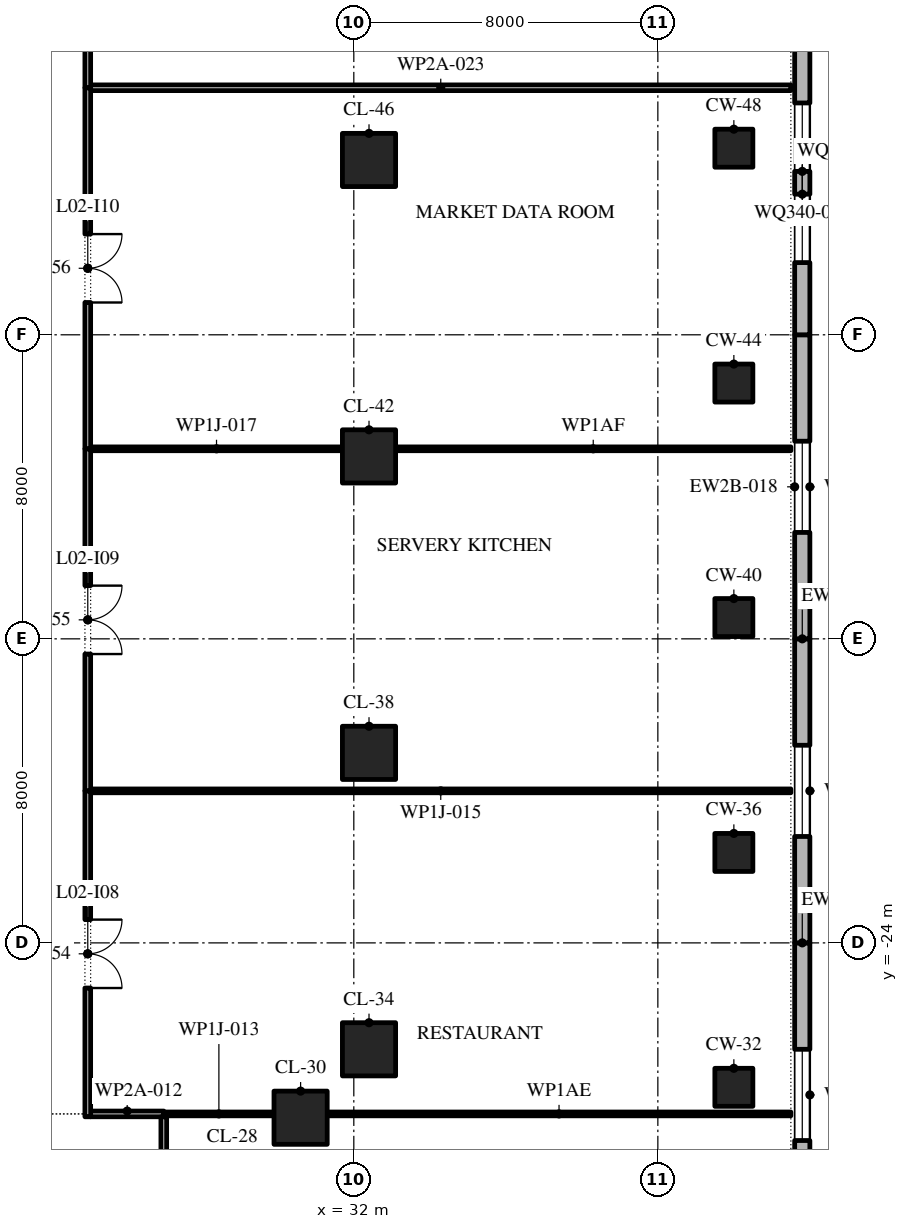
"""IFC4 building model, lengths in metres.
Left out: names, types, materials, properties, quantities, classifications, styles, units other than length and angle.
Written with IfcOpenShell. Run it as: python <this file> out.ifc"""

import sys

from ifc_helpers import new_model, si_unit, direction, frame, frame_2d, origin, origin_2d, place, context, subcontext, project, spatial, polyline, rectangle, outline, extrude, element, fill, save


model = new_model("IFC4")
c1 = context("Model", 3, precision=1e-05, world=origin(), true_north=direction((0.0, 1.0)))
c2 = subcontext(c1, "Body", "Model", "MODEL_VIEW")
j1 = project(units=[si_unit("LENGTHUNIT", "METRE"), si_unit("PLANEANGLEUNIT", "RADIAN")], contexts=[c1])
p1 = place(None, origin())
s1 = spatial("IfcSite", under=j1, at=p1, CompositionType="ELEMENT")
p2 = place(p1, origin())
s2 = spatial("IfcBuilding", under=s1, at=p2, CompositionType="ELEMENT")
p3 = place(p2, frame((0.0, 0.0, 14.0)))
s3 = spatial("IfcBuildingStorey", under=s2, at=p3, CompositionType="ELEMENT", Elevation=14.0)
p4 = place(p3, frame((30.6, -28.6, 0.0), z_axis=(0.0, 0.0, 1.0), x_axis=(1.0, 0.0, 0.0)))
e1 = element("IfcColumn", 1, at=p4, inside=s3, PredefinedType="COLUMN", context=c2, shape_type="SweptSolid", body=[
    extrude(rectangle(XDim=1.4, YDim=1.4, at=origin_2d()), origin(), (0.0, 0.0, 1.0), 5.2),
])
p5 = place(p3, frame((42.0, -27.8, 0.0), z_axis=(0.0, 0.0, 1.0), x_axis=(1.0, 0.0, 0.0)))
e2 = element("IfcColumn", 2, at=p5, inside=s3, PredefinedType="COLUMN", context=c2, shape_type="SweptSolid", body=[
    extrude(rectangle(XDim=1.0, YDim=1.0, at=origin_2d()), origin(), (0.0, 0.0, 1.0), 5.2),
])
p6 = place(p3, frame((32.4, -26.8, 0.0), z_axis=(0.0, 0.0, 1.0), x_axis=(1.0, 0.0, 0.0)))
e3 = element("IfcColumn", 3, at=p6, inside=s3, PredefinedType="COLUMN", context=c2, shape_type="SweptSolid", body=[
    extrude(rectangle(XDim=1.4, YDim=1.4, at=origin_2d()), origin(), (0.0, 0.0, 1.0), 5.2),
])
p7 = place(p3, frame((42.0, -21.62, 0.0), z_axis=(0.0, 0.0, 1.0), x_axis=(1.0, 0.0, 0.0)))
e4 = element("IfcColumn", 4, at=p7, inside=s3, PredefinedType="COLUMN", context=c2, shape_type="SweptSolid", body=[
    extrude(rectangle(XDim=1.0, YDim=1.0, at=origin_2d()), origin(), (0.0, 0.0, 1.0), 5.2),
])
p8 = place(p3, frame((32.4, -19.0, 0.0), z_axis=(0.0, 0.0, 1.0), x_axis=(1.0, 0.0, 0.0)))
e5 = element("IfcColumn", 5, at=p8, inside=s3, PredefinedType="COLUMN", context=c2, shape_type="SweptSolid", body=[
    extrude(rectangle(XDim=1.4, YDim=1.4, at=origin_2d()), origin(), (0.0, 0.0, 1.0), 5.2),
])
p9 = place(p3, frame((42.0, -15.44, 0.0), z_axis=(0.0, 0.0, 1.0), x_axis=(1.0, 0.0, 0.0)))
e6 = element("IfcColumn", 6, at=p9, inside=s3, PredefinedType="COLUMN", context=c2, shape_type="SweptSolid", body=[
    extrude(rectangle(XDim=1.0, YDim=1.0, at=origin_2d()), origin(), (0.0, 0.0, 1.0), 5.2),
])
p10 = place(p3, frame((32.4, -11.2, 0.0), z_axis=(0.0, 0.0, 1.0), x_axis=(1.0, 0.0, 0.0)))
e7 = element("IfcColumn", 7, at=p10, inside=s3, PredefinedType="COLUMN", context=c2, shape_type="SweptSolid", body=[
    extrude(rectangle(XDim=1.4, YDim=1.4, at=origin_2d()), origin(), (0.0, 0.0, 1.0), 5.2),
])
p11 = place(p3, frame((42.0, -9.27, 0.0), z_axis=(0.0, 0.0, 1.0), x_axis=(1.0, 0.0, 0.0)))
e8 = element("IfcColumn", 8, at=p11, inside=s3, PredefinedType="COLUMN", context=c2, shape_type="SweptSolid", body=[
    extrude(rectangle(XDim=1.0, YDim=1.0, at=origin_2d()), origin(), (0.0, 0.0, 1.0), 5.2),
])
p12 = place(p3, frame((32.4, -3.4, 0.0), z_axis=(0.0, 0.0, 1.0), x_axis=(1.0, 0.0, 0.0)))
e9 = element("IfcColumn", 9, at=p12, inside=s3, PredefinedType="COLUMN", context=c2, shape_type="SweptSolid", body=[
    extrude(rectangle(XDim=1.4, YDim=1.4, at=origin_2d()), origin(), (0.0, 0.0, 1.0), 5.2),
])
p13 = place(p3, frame((42.0, -3.09, 0.0), z_axis=(0.0, 0.0, 1.0), x_axis=(1.0, 0.0, 0.0)))
e10 = element("IfcColumn", 10, at=p13, inside=s3, PredefinedType="COLUMN", context=c2, shape_type="SweptSolid", body=[
    extrude(rectangle(XDim=1.0, YDim=1.0, at=origin_2d()), origin(), (0.0, 0.0, 1.0), 5.2),
])
p14 = place(p3, frame((43.8, -32.0, 0.0), z_axis=(0.0, 0.0, 1.0), x_axis=(0.0, 1.0, 0.0)))
e11 = element("IfcWall", 11, at=p14, inside=s3, PredefinedType="STANDARD", context=c2, shape_type="SweptSolid", body=[
    extrude(rectangle(XDim=8.0, YDim=0.4, at=frame_2d((4.0, 0.0))), origin(), (0.0, 0.0, 1.0), 4.9),
])
p15 = place(p14, frame((2.8, 0.0, 0.9)))
e12 = element("IfcOpeningElement", 12, at=p15, cuts=e11, PredefinedType="OPENING", context=c2, shape_type="SweptSolid", body=[
    extrude(outline(polyline([(0.0, 0.0), (2.4, 0.0), (2.4, 1.7), (2.379, 1.976), (2.315, 2.246), (2.212, 2.502), (2.07, 2.74), (1.893, 2.954), (1.686, 3.137), (1.453, 3.287), (1.2, 3.4), (0.947, 3.287), (0.714, 3.137), (0.507, 2.954), (0.33, 2.74), (0.188, 2.502), (0.084, 2.246), (0.021, 1.976), (0.0, 1.7), (0.0, 0.0)])), frame((0.0, 0.21, 0.0), z_axis=(0.0, -1.0, 0.0), x_axis=(1.0, 0.0, 0.0)), (0.0, 0.0, 1.0), 0.42),
])
p16 = place(p3, frame((43.8, -24.0, 0.0), z_axis=(0.0, 0.0, 1.0), x_axis=(0.0, 1.0, 0.0)))
e13 = element("IfcWall", 13, at=p16, inside=s3, PredefinedType="STANDARD", context=c2, shape_type="SweptSolid", body=[
    extrude(rectangle(XDim=8.0, YDim=0.4, at=frame_2d((4.0, 0.0))), origin(), (0.0, 0.0, 1.0), 4.9),
])
p17 = place(p16, frame((2.8, 0.0, 0.9)))
e14 = element("IfcOpeningElement", 14, at=p17, cuts=e13, PredefinedType="OPENING", context=c2, shape_type="SweptSolid", body=[
    extrude(outline(polyline([(0.0, 0.0), (2.4, 0.0), (2.4, 1.7), (2.379, 1.976), (2.315, 2.246), (2.212, 2.502), (2.07, 2.74), (1.893, 2.954), (1.686, 3.137), (1.453, 3.287), (1.2, 3.4), (0.947, 3.287), (0.714, 3.137), (0.507, 2.954), (0.33, 2.74), (0.188, 2.502), (0.084, 2.246), (0.021, 1.976), (0.0, 1.7), (0.0, 0.0)])), frame((0.0, 0.21, 0.0), z_axis=(0.0, -1.0, 0.0), x_axis=(1.0, 0.0, 0.0)), (0.0, 0.0, 1.0), 0.42),
])
p18 = place(p3, frame((43.8, -16.0, 0.0), z_axis=(0.0, 0.0, 1.0), x_axis=(0.0, 1.0, 0.0)))
e15 = element("IfcWall", 15, at=p18, inside=s3, PredefinedType="STANDARD", context=c2, shape_type="SweptSolid", body=[
    extrude(rectangle(XDim=8.0, YDim=0.4, at=frame_2d((4.0, 0.0))), origin(), (0.0, 0.0, 1.0), 4.9),
])
p19 = place(p18, frame((2.8, 0.0, 0.9)))
e16 = element("IfcOpeningElement", 16, at=p19, cuts=e15, PredefinedType="OPENING", context=c2, shape_type="SweptSolid", body=[
    extrude(outline(polyline([(0.0, 0.0), (2.4, 0.0), (2.4, 1.7), (2.379, 1.976), (2.315, 2.246), (2.212, 2.502), (2.07, 2.74), (1.893, 2.954), (1.686, 3.137), (1.453, 3.287), (1.2, 3.4), (0.947, 3.287), (0.714, 3.137), (0.507, 2.954), (0.33, 2.74), (0.188, 2.502), (0.084, 2.246), (0.021, 1.976), (0.0, 1.7), (0.0, 0.0)])), frame((0.0, 0.21, 0.0), z_axis=(0.0, -1.0, 0.0), x_axis=(1.0, 0.0, 0.0)), (0.0, 0.0, 1.0), 0.42),
])
p20 = place(p3, frame((43.8, -8.0, 0.0), z_axis=(0.0, 0.0, 1.0), x_axis=(0.0, 1.0, 0.0)))
e17 = element("IfcWall", 17, at=p20, inside=s3, PredefinedType="STANDARD", context=c2, shape_type="SweptSolid", body=[
    extrude(rectangle(XDim=8.0, YDim=0.4, at=frame_2d((4.0, 0.0))), origin(), (0.0, 0.0, 1.0), 4.9),
])
p21 = place(p20, frame((1.9, 0.0, 0.9)))
e18 = element("IfcOpeningElement", 18, at=p21, cuts=e17, PredefinedType="OPENING", context=c2, shape_type="SweptSolid", body=[
    extrude(outline(polyline([(0.0, 0.0), (1.8, 0.0), (1.8, 1.841), (1.785, 2.076), (1.739, 2.307), (1.663, 2.53), (1.559, 2.741), (1.428, 2.937), (1.273, 3.114), (1.096, 3.269), (0.9, 3.4), (0.704, 3.269), (0.527, 3.114), (0.372, 2.937), (0.241, 2.741), (0.137, 2.53), (0.061, 2.307), (0.015, 2.076), (0.0, 1.841), (0.0, 0.0)])), frame((0.0, 0.21, 0.0), z_axis=(0.0, -1.0, 0.0), x_axis=(1.0, 0.0, 0.0)), (0.0, 0.0, 1.0), 0.42),
])
p22 = place(p20, frame((4.3, 0.0, 0.9)))
e19 = element("IfcOpeningElement", 19, at=p22, cuts=e17, PredefinedType="OPENING", context=c2, shape_type="SweptSolid", body=[
    extrude(outline(polyline([(0.0, 0.0), (1.8, 0.0), (1.8, 1.841), (1.785, 2.076), (1.739, 2.307), (1.663, 2.53), (1.559, 2.741), (1.428, 2.937), (1.273, 3.114), (1.096, 3.269), (0.9, 3.4), (0.704, 3.269), (0.527, 3.114), (0.372, 2.937), (0.241, 2.741), (0.137, 2.53), (0.061, 2.307), (0.015, 2.076), (0.0, 1.841), (0.0, 0.0)])), frame((0.0, 0.21, 0.0), z_axis=(0.0, -1.0, 0.0), x_axis=(1.0, 0.0, 0.0)), (0.0, 0.0, 1.0), 0.42),
])
p23 = place(p3, frame((25.075, -28.5, 0.0), z_axis=(0.0, 0.0, 1.0), x_axis=(1.0, 0.0, 0.0)))
e20 = element("IfcWall", 20, at=p23, inside=s3, PredefinedType="PARTITIONING", context=c2, shape_type="SweptSolid", body=[
    extrude(rectangle(XDim=1.925, YDim=0.15, at=frame_2d((0.962, 0.0))), origin(), (0.0, 0.0, 1.0), 4.9),
])
p24 = place(p3, frame((27.0, -28.5, 0.0), z_axis=(0.0, 0.0, 1.0), x_axis=(1.0, 0.0, 0.0)))
e21 = element("IfcWall", 21, at=p24, inside=s3, PredefinedType="PARTITIONING", context=c2, shape_type="SweptSolid", body=[
    extrude(rectangle(XDim=2.9, YDim=0.1, at=frame_2d((1.45, 0.0))), origin(), (0.0, 0.0, 1.0), 4.9),
])
p25 = place(p3, frame((31.3, -28.5, 0.0), z_axis=(0.0, 0.0, 1.0), x_axis=(1.0, 0.0, 0.0)))
e22 = element("IfcWall", 22, at=p25, inside=s3, PredefinedType="PARTITIONING", context=c2, shape_type="SweptSolid", body=[
    extrude(rectangle(XDim=12.2, YDim=0.1, at=frame_2d((6.1, 0.0))), origin(), (0.0, 0.0, 1.0), 4.364),
])
p26 = place(p3, frame((25.075, -20.0, 0.0), z_axis=(0.0, 0.0, 1.0), x_axis=(1.0, 0.0, 0.0)))
e23 = element("IfcWall", 23, at=p26, inside=s3, PredefinedType="PARTITIONING", context=c2, shape_type="SweptSolid", body=[
    extrude(rectangle(XDim=18.425, YDim=0.1, at=frame_2d((9.212, 0.0))), origin(), (0.0, 0.0, 1.0), 4.9),
])
p27 = place(p3, frame((25.075, -11.0, 0.0), z_axis=(0.0, 0.0, 1.0), x_axis=(1.0, 0.0, 0.0)))
e24 = element("IfcWall", 24, at=p27, inside=s3, PredefinedType="PARTITIONING", context=c2, shape_type="SweptSolid", body=[
    extrude(rectangle(XDim=6.625, YDim=0.1, at=frame_2d((3.312, 0.0))), origin(), (0.0, 0.0, 1.0), 4.9),
])
p28 = place(p3, frame((33.1, -11.0, 0.0), z_axis=(0.0, 0.0, 1.0), x_axis=(1.0, 0.0, 0.0)))
e25 = element("IfcWall", 25, at=p28, inside=s3, PredefinedType="PARTITIONING", context=c2, shape_type="SweptSolid", body=[
    extrude(rectangle(XDim=10.4, YDim=0.1, at=frame_2d((5.2, 0.0))), origin(), (0.0, 0.0, 1.0), 4.443),
])
p29 = place(p3, frame((25.075, -1.5, 0.0), z_axis=(0.0, 0.0, 1.0), x_axis=(1.0, 0.0, 0.0)))
e26 = element("IfcWall", 26, at=p29, inside=s3, PredefinedType="PARTITIONING", context=c2, shape_type="SweptSolid", body=[
    extrude(rectangle(XDim=18.425, YDim=0.15, at=frame_2d((9.212, 0.0))), origin(), (0.0, 0.0, 1.0), 4.9),
])
p30 = place(p3, frame((25.0, -28.575, 0.0), z_axis=(0.0, 0.0, 1.0), x_axis=(0.0, 1.0, 0.0)))
e27 = element("IfcWall", 27, at=p30, inside=s3, PredefinedType="PARTITIONING", context=c2, shape_type="SweptSolid", body=[
    extrude(rectangle(XDim=8.575, YDim=0.15, at=frame_2d((4.288, 0.0))), origin(), (0.0, 0.0, 1.0), 4.9),
])
p31 = place(p30, frame((3.387, 0.0, 0.0)))
e28 = element("IfcOpeningElement", 28, at=p31, cuts=e27, PredefinedType="OPENING", context=c2, shape_type="SweptSolid", body=[
    extrude(rectangle(XDim=1.8, YDim=2.1, at=frame_2d((0.9, 1.05))), frame((0.0, 0.085, 0.0), z_axis=(0.0, -1.0, 0.0), x_axis=(1.0, 0.0, 0.0)), (0.0, 0.0, 1.0), 0.17),
])
p32 = place(p3, frame((25.0, -20.0, 0.0), z_axis=(0.0, 0.0, 1.0), x_axis=(0.0, 1.0, 0.0)))
e29 = element("IfcWall", 29, at=p32, inside=s3, PredefinedType="PARTITIONING", context=c2, shape_type="SweptSolid", body=[
    extrude(rectangle(XDim=9.0, YDim=0.15, at=frame_2d((4.5, 0.0))), origin(), (0.0, 0.0, 1.0), 4.9),
])
p33 = place(p32, frame((3.6, 0.0, 0.0)))
e30 = element("IfcOpeningElement", 30, at=p33, cuts=e29, PredefinedType="OPENING", context=c2, shape_type="SweptSolid", body=[
    extrude(rectangle(XDim=1.8, YDim=2.1, at=frame_2d((0.9, 1.05))), frame((0.0, 0.085, 0.0), z_axis=(0.0, -1.0, 0.0), x_axis=(1.0, 0.0, 0.0)), (0.0, 0.0, 1.0), 0.17),
])
p34 = place(p3, frame((25.0, -11.0, 0.0), z_axis=(0.0, 0.0, 1.0), x_axis=(0.0, 1.0, 0.0)))
e31 = element("IfcWall", 31, at=p34, inside=s3, PredefinedType="PARTITIONING", context=c2, shape_type="SweptSolid", body=[
    extrude(rectangle(XDim=9.5, YDim=0.15, at=frame_2d((4.75, 0.0))), origin(), (0.0, 0.0, 1.0), 4.9),
])
p35 = place(p34, frame((3.85, 0.0, 0.0)))
e32 = element("IfcOpeningElement", 32, at=p35, cuts=e31, PredefinedType="OPENING", context=c2, shape_type="SweptSolid", body=[
    extrude(rectangle(XDim=1.8, YDim=2.1, at=frame_2d((0.9, 1.05))), frame((0.0, 0.085, 0.0), z_axis=(0.0, -1.0, 0.0), x_axis=(1.0, 0.0, 0.0)), (0.0, 0.0, 1.0), 0.17),
])
p36 = place(p3, frame((25.0, -1.5, 0.0), z_axis=(0.0, 0.0, 1.0), x_axis=(0.0, 1.0, 0.0)))
e33 = element("IfcWall", 33, at=p36, inside=s3, PredefinedType="PARTITIONING", context=c2, shape_type="SweptSolid", body=[
    extrude(rectangle(XDim=9.5, YDim=0.15, at=frame_2d((4.75, 0.0))), origin(), (0.0, 0.0, 1.0), 4.9),
])
p37 = place(p36, frame((3.85, 0.0, 0.0)))
e34 = element("IfcOpeningElement", 34, at=p37, cuts=e33, PredefinedType="OPENING", context=c2, shape_type="SweptSolid", body=[
    extrude(rectangle(XDim=1.8, YDim=2.1, at=frame_2d((0.9, 1.05))), frame((0.0, 0.085, 0.0), z_axis=(0.0, -1.0, 0.0), x_axis=(1.0, 0.0, 0.0)), (0.0, 0.0, 1.0), 0.17),
])
p38 = place(p3, frame((27.0, -32.0, 0.0), z_axis=(0.0, 0.0, 1.0), x_axis=(0.0, 1.0, 0.0)))
e35 = element("IfcWall", 35, at=p38, inside=s3, PredefinedType="PARTITIONING", context=c2, shape_type="SweptSolid", body=[
    extrude(rectangle(XDim=3.425, YDim=0.15, at=frame_2d((1.712, 0.0))), origin(), (0.0, 0.0, 1.0), 4.9),
])
p39 = place(p15, origin())
e36 = element("IfcWindow", 36, at=p39, inside=s3, PartitioningType="DOUBLE_PANEL_VERTICAL", PredefinedType="WINDOW", context=c2, shape_type="SweptSolid", body=[
    extrude(outline(polyline([(0.0, 0.0), (2.4, 0.0), (2.4, 1.7), (2.379, 1.976), (2.315, 2.246), (2.212, 2.502), (2.07, 2.74), (1.893, 2.954), (1.686, 3.137), (1.453, 3.287), (1.2, 3.4), (0.947, 3.287), (0.714, 3.137), (0.507, 2.954), (0.33, 2.74), (0.188, 2.502), (0.084, 2.246), (0.021, 1.976), (0.0, 1.7), (0.0, 0.0)])), frame((0.0, 0.03, 0.0), z_axis=(0.0, -1.0, 0.0), x_axis=(1.0, 0.0, 0.0)), (0.0, 0.0, 1.0), 0.06),
])
fill(e12, e36)
p40 = place(p17, origin())
e37 = element("IfcWindow", 37, at=p40, inside=s3, PartitioningType="DOUBLE_PANEL_VERTICAL", PredefinedType="WINDOW", context=c2, shape_type="SweptSolid", body=[
    extrude(outline(polyline([(0.0, 0.0), (2.4, 0.0), (2.4, 1.7), (2.379, 1.976), (2.315, 2.246), (2.212, 2.502), (2.07, 2.74), (1.893, 2.954), (1.686, 3.137), (1.453, 3.287), (1.2, 3.4), (0.947, 3.287), (0.714, 3.137), (0.507, 2.954), (0.33, 2.74), (0.188, 2.502), (0.084, 2.246), (0.021, 1.976), (0.0, 1.7), (0.0, 0.0)])), frame((0.0, 0.03, 0.0), z_axis=(0.0, -1.0, 0.0), x_axis=(1.0, 0.0, 0.0)), (0.0, 0.0, 1.0), 0.06),
])
fill(e14, e37)
p41 = place(p19, origin())
e38 = element("IfcWindow", 38, at=p41, inside=s3, PartitioningType="DOUBLE_PANEL_VERTICAL", PredefinedType="WINDOW", context=c2, shape_type="SweptSolid", body=[
    extrude(outline(polyline([(0.0, 0.0), (2.4, 0.0), (2.4, 1.7), (2.379, 1.976), (2.315, 2.246), (2.212, 2.502), (2.07, 2.74), (1.893, 2.954), (1.686, 3.137), (1.453, 3.287), (1.2, 3.4), (0.947, 3.287), (0.714, 3.137), (0.507, 2.954), (0.33, 2.74), (0.188, 2.502), (0.084, 2.246), (0.021, 1.976), (0.0, 1.7), (0.0, 0.0)])), frame((0.0, 0.03, 0.0), z_axis=(0.0, -1.0, 0.0), x_axis=(1.0, 0.0, 0.0)), (0.0, 0.0, 1.0), 0.06),
])
fill(e16, e38)
p42 = place(p21, origin())
e39 = element("IfcWindow", 39, at=p42, inside=s3, PartitioningType="DOUBLE_PANEL_VERTICAL", PredefinedType="WINDOW", context=c2, shape_type="SweptSolid", body=[
    extrude(outline(polyline([(0.0, 0.0), (1.8, 0.0), (1.8, 1.841), (1.785, 2.076), (1.739, 2.307), (1.663, 2.53), (1.559, 2.741), (1.428, 2.937), (1.273, 3.114), (1.096, 3.269), (0.9, 3.4), (0.704, 3.269), (0.527, 3.114), (0.372, 2.937), (0.241, 2.741), (0.137, 2.53), (0.061, 2.307), (0.015, 2.076), (0.0, 1.841), (0.0, 0.0)])), frame((0.0, 0.03, 0.0), z_axis=(0.0, -1.0, 0.0), x_axis=(1.0, 0.0, 0.0)), (0.0, 0.0, 1.0), 0.06),
])
fill(e18, e39)
p43 = place(p22, origin())
e40 = element("IfcWindow", 40, at=p43, inside=s3, PartitioningType="DOUBLE_PANEL_VERTICAL", PredefinedType="WINDOW", context=c2, shape_type="SweptSolid", body=[
    extrude(outline(polyline([(0.0, 0.0), (1.8, 0.0), (1.8, 1.841), (1.785, 2.076), (1.739, 2.307), (1.663, 2.53), (1.559, 2.741), (1.428, 2.937), (1.273, 3.114), (1.096, 3.269), (0.9, 3.4), (0.704, 3.269), (0.527, 3.114), (0.372, 2.937), (0.241, 2.741), (0.137, 2.53), (0.061, 2.307), (0.015, 2.076), (0.0, 1.841), (0.0, 0.0)])), frame((0.0, 0.03, 0.0), z_axis=(0.0, -1.0, 0.0), x_axis=(1.0, 0.0, 0.0)), (0.0, 0.0, 1.0), 0.06),
])
fill(e19, e40)
p44 = place(p31, frame((1.8, 0.0, 0.0), z_axis=(0.0, 0.0, 1.0), x_axis=(-1.0, 0.0, 0.0)))
e41 = element("IfcDoor", 41, at=p44, inside=s3, OperationType="SINGLE_SWING_RIGHT", PredefinedType="DOOR", context=c2, shape_type="SweptSolid", body=[
    extrude(rectangle(XDim=1.8, YDim=2.1, at=frame_2d((0.9, 1.05))), frame((0.0, 0.025, 0.0), z_axis=(0.0, -1.0, 0.0), x_axis=(1.0, 0.0, 0.0)), (0.0, 0.0, 1.0), 0.05),
])
fill(e28, e41)
p45 = place(p33, frame((1.8, 0.0, 0.0), z_axis=(0.0, 0.0, 1.0), x_axis=(-1.0, 0.0, 0.0)))
e42 = element("IfcDoor", 42, at=p45, inside=s3, OperationType="SINGLE_SWING_RIGHT", PredefinedType="DOOR", context=c2, shape_type="SweptSolid", body=[
    extrude(rectangle(XDim=1.8, YDim=2.1, at=frame_2d((0.9, 1.05))), frame((0.0, 0.025, 0.0), z_axis=(0.0, -1.0, 0.0), x_axis=(1.0, 0.0, 0.0)), (0.0, 0.0, 1.0), 0.05),
])
fill(e30, e42)
p46 = place(p35, frame((1.8, 0.0, 0.0), z_axis=(0.0, 0.0, 1.0), x_axis=(-1.0, 0.0, 0.0)))
e43 = element("IfcDoor", 43, at=p46, inside=s3, OperationType="SINGLE_SWING_LEFT", PredefinedType="DOOR", context=c2, shape_type="SweptSolid", body=[
    extrude(rectangle(XDim=1.8, YDim=2.1, at=frame_2d((0.9, 1.05))), frame((0.0, 0.025, 0.0), z_axis=(0.0, -1.0, 0.0), x_axis=(1.0, 0.0, 0.0)), (0.0, 0.0, 1.0), 0.05),
])
fill(e32, e43)
save(model, sys.argv[1])
